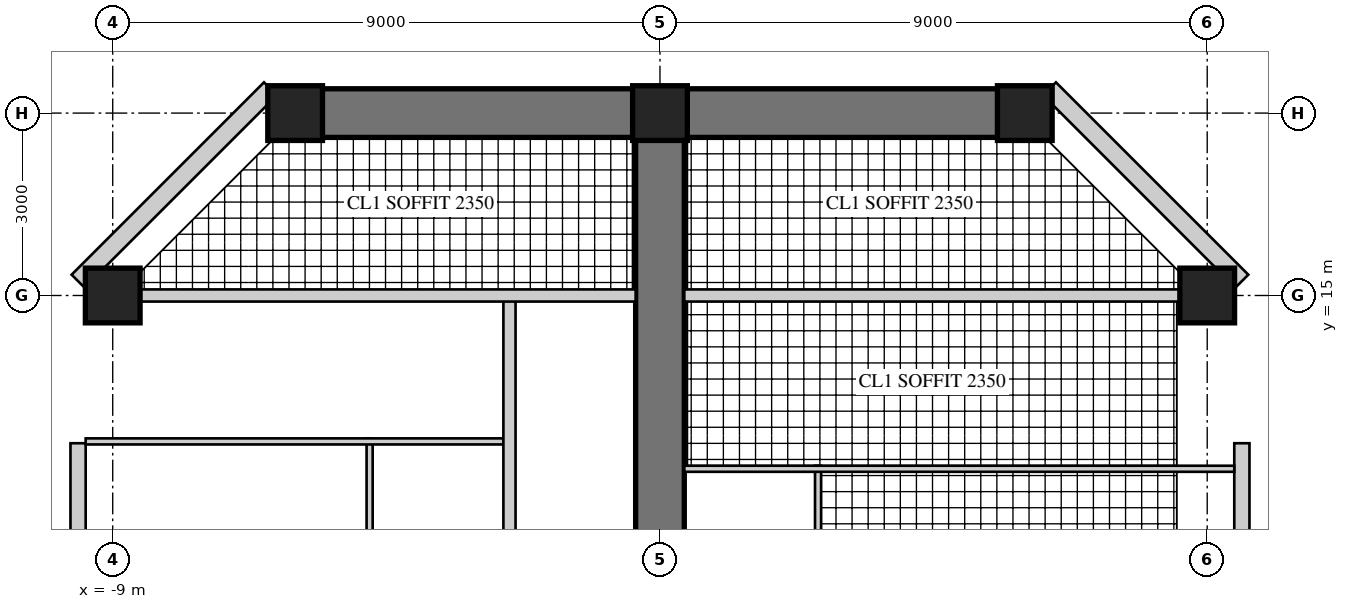
"""IFC4 building model, lengths in metres.
Left out: names, types, materials, properties, quantities, classifications, styles, units other than length and angle.
Written with IfcOpenShell. Run it as: python <this file> out.ifc"""

import sys

from ifc_helpers import new_model, si_unit, direction, frame, frame_2d, origin, origin_2d, place, context, subcontext, project, spatial, rectangle, hollow_rectangle, extrude, element, fill, save


model = new_model("IFC4")
c1 = context("Model", 3, precision=1e-05, world=origin(), true_north=direction((0.0, 1.0)))
c2 = subcontext(c1, "Body", "Model", "MODEL_VIEW")
j1 = project(units=[si_unit("LENGTHUNIT", "METRE"), si_unit("PLANEANGLEUNIT", "RADIAN")], contexts=[c1])
p1 = place(None, origin())
s1 = spatial("IfcSite", under=j1, at=p1, CompositionType="ELEMENT")
p2 = place(p1, origin())
s2 = spatial("IfcBuilding", under=s1, at=p2, CompositionType="ELEMENT")
p3 = place(p2, frame((0.0, 0.0, 179.7)))
s3 = spatial("IfcBuildingStorey", under=s2, at=p3, CompositionType="ELEMENT", Elevation=179.7)
p4 = place(p3, frame((0.0, 9.0, 0.0), z_axis=(0.0, 0.0, 1.0), x_axis=(0.0, 1.0, 0.0)))
e1 = element("IfcWall", 1, at=p4, inside=s3, PredefinedType="SHEAR", context=c2, shape_type="SweptSolid", body=[
    extrude(rectangle(XDim=9.0, YDim=0.8, at=frame_2d((4.5, 0.0))), origin(), (0.0, 0.0, 1.0), 3.4),
])
p5 = place(p4, frame((3.95, 0.0, 0.0)))
e2 = element("IfcOpeningElement", 2, at=p5, cuts=e1, PredefinedType="OPENING", context=c2, shape_type="SweptSolid", body=[
    extrude(rectangle(XDim=1.0, YDim=2.15, at=frame_2d((0.5, 1.075))), frame((0.0, 0.41, 0.0), z_axis=(0.0, -1.0, 0.0), x_axis=(1.0, 0.0, 0.0)), (0.0, 0.0, 1.0), 0.82),
])
p6 = place(p4, frame((7.0, 0.0, 0.0)))
e3 = element("IfcOpeningElement", 3, at=p6, cuts=e1, PredefinedType="OPENING", context=c2, shape_type="SweptSolid", body=[
    extrude(rectangle(XDim=1.0, YDim=2.2, at=frame_2d((0.5, 1.1))), frame((0.0, 0.41, 0.0), z_axis=(0.0, -1.0, 0.0), x_axis=(1.0, 0.0, 0.0)), (0.0, 0.0, 1.0), 0.82),
])
p7 = place(p3, frame((6.0, 18.0, 0.0), z_axis=(0.0, 0.0, 1.0), x_axis=(-1.0, 0.0, 0.0)))
e4 = element("IfcWall", 4, at=p7, inside=s3, PredefinedType="SHEAR", context=c2, shape_type="SweptSolid", body=[
    extrude(rectangle(XDim=12.0, YDim=0.8, at=frame_2d((6.0, 0.0))), origin(), (0.0, 0.0, 1.0), 3.4),
])
p8 = place(p7, frame((1.625, 0.0, 0.6)))
e5 = element("IfcOpeningElement", 5, at=p8, cuts=e4, PredefinedType="OPENING", context=c2, shape_type="SweptSolid", body=[
    extrude(rectangle(XDim=3.0, YDim=2.4, at=frame_2d((1.5, 1.2))), frame((0.0, 0.41, 0.0), z_axis=(0.0, -1.0, 0.0), x_axis=(1.0, 0.0, 0.0)), (0.0, 0.0, 1.0), 0.82),
])
p9 = place(p7, frame((7.375, 0.0, 0.6)))
e6 = element("IfcOpeningElement", 6, at=p9, cuts=e4, PredefinedType="OPENING", context=c2, shape_type="SweptSolid", body=[
    extrude(rectangle(XDim=3.0, YDim=2.4, at=frame_2d((1.5, 1.2))), frame((0.0, 0.41, 0.0), z_axis=(0.0, -1.0, 0.0), x_axis=(1.0, 0.0, 0.0)), (0.0, 0.0, 1.0), 0.82),
])
for number, where, z_axis, x_axis in (
    (7, (9.0, 15.0, 0.0), (0.0, 0.0, 1.0), (1.0, 0.0, 0.0)),
    (8, (-9.0, 15.0, 0.0), (0.0, 0.0, 1.0), (1.0, 0.0, 0.0)),
    (9, (6.0, 18.0, 0.0), (0.0, 0.0, 1.0), (1.0, 0.0, 0.0)),
    (10, (0.0, 18.0, 0.0), (0.0, 0.0, 1.0), (1.0, 0.0, 0.0)),
    (11, (-6.0, 18.0, 0.0), (0.0, 0.0, 1.0), (1.0, 0.0, 0.0)),
):
    element("IfcColumn", number, at=place(p3, frame(where, z_axis=z_axis, x_axis=x_axis)), inside=s3, PredefinedType="COLUMN", context=c2, shape_type="SweptSolid", body=[
        extrude(rectangle(XDim=0.9, YDim=0.9, at=origin_2d()), origin(), (0.0, 0.0, 1.0), 3.4),
    ])
p10 = place(p3, frame((9.57, 9.445, 0.0), z_axis=(0.0, 0.0, 1.0), x_axis=(0.0, 1.0, 0.0)))
e12 = element("IfcWall", 12, at=p10, inside=s3, PredefinedType="SOLIDWALL", context=c2, shape_type="SweptSolid", body=[
    extrude(rectangle(XDim=3.125, YDim=0.25, at=frame_2d((1.562, 0.0))), origin(), (0.0, 0.0, 1.0), 3.22),
])
p11 = place(p10, frame((0.6, 0.0, 0.0)))
e13 = element("IfcOpeningElement", 13, at=p11, cuts=e12, PredefinedType="OPENING", context=c2, shape_type="SweptSolid", body=[
    extrude(rectangle(XDim=1.0, YDim=2.2, at=frame_2d((0.5, 1.1))), frame((0.0, 0.135, 0.0), z_axis=(0.0, -1.0, 0.0), x_axis=(1.0, 0.0, 0.0)), (0.0, 0.0, 1.0), 0.27),
])
p12 = place(p3, frame((9.57, 15.236, 0.0), z_axis=(0.0, 0.0, 1.0), x_axis=(-0.707134062067, 0.707079499254, 0.0)))
e14 = element("IfcWall", 14, at=p12, inside=s3, PredefinedType="SOLIDWALL", context=c2, shape_type="SweptSolid", body=[
    extrude(rectangle(XDim=4.475, YDim=0.3, at=frame_2d((2.237, 0.0))), origin(), (0.0, 0.0, 1.0), 3.22),
])
p13 = place(p12, frame((1.787, 0.0, 0.3)))
e15 = element("IfcOpeningElement", 15, at=p13, cuts=e14, PredefinedType="OPENING", context=c2, shape_type="SweptSolid", body=[
    extrude(rectangle(XDim=0.9, YDim=2.4, at=frame_2d((0.45, 1.2))), frame((0.0, 0.16, 0.0), z_axis=(0.0, -1.0, 0.0), x_axis=(1.0, 0.0, 0.0)), (0.0, 0.0, 1.0), 0.32),
])
p14 = place(p3, frame((-6.406, 18.4, 0.0), z_axis=(0.0, 0.0, 1.0), x_axis=(-0.707134062067, -0.707079499254, 0.0)))
e16 = element("IfcWall", 16, at=p14, inside=s3, PredefinedType="SOLIDWALL", context=c2, shape_type="SweptSolid", body=[
    extrude(rectangle(XDim=4.475, YDim=0.3, at=frame_2d((2.237, 0.0))), origin(), (0.0, 0.0, 1.0), 3.22),
])
p15 = place(p14, frame((1.787, 0.0, 0.3)))
e17 = element("IfcOpeningElement", 17, at=p15, cuts=e16, PredefinedType="OPENING", context=c2, shape_type="SweptSolid", body=[
    extrude(rectangle(XDim=0.9, YDim=2.4, at=frame_2d((0.45, 1.2))), frame((0.0, 0.16, 0.0), z_axis=(0.0, -1.0, 0.0), x_axis=(1.0, 0.0, 0.0)), (0.0, 0.0, 1.0), 0.32),
])
p16 = place(p3, frame((-9.57, 12.57, 0.0), z_axis=(0.0, 0.0, 1.0), x_axis=(0.0, -1.0, 0.0)))
e18 = element("IfcWall", 18, at=p16, inside=s3, PredefinedType="SOLIDWALL", context=c2, shape_type="SweptSolid", body=[
    extrude(rectangle(XDim=2.875, YDim=0.25, at=frame_2d((1.438, 0.0))), origin(), (0.0, 0.0, 1.0), 3.22),
])
p17 = place(p16, frame((0.6, 0.0, 0.0)))
e19 = element("IfcOpeningElement", 19, at=p17, cuts=e18, PredefinedType="OPENING", context=c2, shape_type="SweptSolid", body=[
    extrude(rectangle(XDim=1.0, YDim=2.2, at=frame_2d((0.5, 1.1))), frame((0.0, 0.135, 0.0), z_axis=(0.0, -1.0, 0.0), x_axis=(1.0, 0.0, 0.0)), (0.0, 0.0, 1.0), 0.27),
])
p18 = place(p3, frame((-4.775, 9.55, 0.0), z_axis=(0.0, 0.0, 1.0), x_axis=(0.0, 1.0, 0.0)))
e20 = element("IfcWall", 20, at=p18, inside=s3, PredefinedType="PARTITIONING", context=c2, shape_type="SweptSolid", body=[
    extrude(rectangle(XDim=3.1, YDim=0.1, at=frame_2d((1.55, 0.0))), origin(), (0.0, 0.0, 1.0), 3.22),
])
p19 = place(p3, frame((-2.575, 12.6, 0.0), z_axis=(0.0, 0.0, 1.0), x_axis=(-1.0, 0.0, 0.0)))
e21 = element("IfcWall", 21, at=p19, inside=s3, PredefinedType="PARTITIONING", context=c2, shape_type="SweptSolid", body=[
    extrude(rectangle(XDim=6.87, YDim=0.1, at=frame_2d((3.435, 0.0))), origin(), (0.0, 0.0, 1.0), 3.22),
])
p20 = place(p19, frame((0.55, 0.0, 0.0)))
e22 = element("IfcOpeningElement", 22, at=p20, cuts=e21, PredefinedType="OPENING", context=c2, shape_type="SweptSolid", body=[
    extrude(rectangle(XDim=0.9, YDim=2.1, at=frame_2d((0.45, 1.05))), frame((0.0, 0.06, 0.0), z_axis=(0.0, -1.0, 0.0), x_axis=(1.0, 0.0, 0.0)), (0.0, 0.0, 1.0), 0.12),
])
p21 = place(p19, frame((2.65, 0.0, 0.0)))
e23 = element("IfcOpeningElement", 23, at=p21, cuts=e21, PredefinedType="OPENING", context=c2, shape_type="SweptSolid", body=[
    extrude(rectangle(XDim=0.9, YDim=2.1, at=frame_2d((0.45, 1.05))), frame((0.0, 0.06, 0.0), z_axis=(0.0, -1.0, 0.0), x_axis=(1.0, 0.0, 0.0)), (0.0, 0.0, 1.0), 0.12),
])
p22 = place(p3, frame((2.6, 9.55, 0.0), z_axis=(0.0, 0.0, 1.0), x_axis=(0.0, 1.0, 0.0)))
e24 = element("IfcWall", 24, at=p22, inside=s3, PredefinedType="PARTITIONING", context=c2, shape_type="SweptSolid", body=[
    extrude(rectangle(XDim=2.65, YDim=0.1, at=frame_2d((1.325, 0.0))), origin(), (0.0, 0.0, 1.0), 3.22),
])
p23 = place(p3, frame((9.445, 12.15, 0.0), z_axis=(0.0, 0.0, 1.0), x_axis=(-1.0, 0.0, 0.0)))
e25 = element("IfcWall", 25, at=p23, inside=s3, PredefinedType="PARTITIONING", context=c2, shape_type="SweptSolid", body=[
    extrude(rectangle(XDim=9.045, YDim=0.1, at=frame_2d((4.522, 0.0))), origin(), (0.0, 0.0, 1.0), 3.22),
])
p24 = place(p23, frame((5.495, 0.0, 0.0)))
e26 = element("IfcOpeningElement", 26, at=p24, cuts=e25, PredefinedType="OPENING", context=c2, shape_type="SweptSolid", body=[
    extrude(rectangle(XDim=0.9, YDim=2.1, at=frame_2d((0.45, 1.05))), frame((0.0, 0.06, 0.0), z_axis=(0.0, -1.0, 0.0), x_axis=(1.0, 0.0, 0.0)), (0.0, 0.0, 1.0), 0.12),
])
p25 = place(p23, frame((7.595, 0.0, 0.0)))
e27 = element("IfcOpeningElement", 27, at=p25, cuts=e25, PredefinedType="OPENING", context=c2, shape_type="SweptSolid", body=[
    extrude(rectangle(XDim=0.9, YDim=2.1, at=frame_2d((0.45, 1.05))), frame((0.0, 0.06, 0.0), z_axis=(0.0, -1.0, 0.0), x_axis=(1.0, 0.0, 0.0)), (0.0, 0.0, 1.0), 0.12),
])
p26 = place(p3, frame((-2.475, 9.55, 0.0), z_axis=(0.0, 0.0, 1.0), x_axis=(0.0, 1.0, 0.0)))
e28 = element("IfcWall", 28, at=p26, inside=s3, PredefinedType="SOLIDWALL", context=c2, shape_type="SweptSolid", body=[
    extrude(rectangle(XDim=5.45, YDim=0.2, at=frame_2d((2.725, 0.0))), origin(), (0.0, 0.0, 1.0), 3.22),
])
p27 = place(p26, frame((3.6, 0.0, 0.0)))
e29 = element("IfcOpeningElement", 29, at=p27, cuts=e28, PredefinedType="OPENING", context=c2, shape_type="SweptSolid", body=[
    extrude(rectangle(XDim=1.0, YDim=2.15, at=frame_2d((0.5, 1.075))), frame((0.0, 0.11, 0.0), z_axis=(0.0, -1.0, 0.0), x_axis=(1.0, 0.0, 0.0)), (0.0, 0.0, 1.0), 0.22),
])
p28 = place(p3, frame((8.55, 15.0, 0.0), z_axis=(0.0, 0.0, 1.0), x_axis=(-1.0, 0.0, 0.0)))
e30 = element("IfcWall", 30, at=p28, inside=s3, PredefinedType="SOLIDWALL", context=c2, shape_type="SweptSolid", body=[
    extrude(rectangle(XDim=8.15, YDim=0.2, at=frame_2d((4.075, 0.0))), origin(), (0.0, 0.0, 1.0), 2.47),
])
p29 = place(p3, frame((-0.4, 15.0, 0.0), z_axis=(0.0, 0.0, 1.0), x_axis=(-1.0, 0.0, 0.0)))
e31 = element("IfcWall", 31, at=p29, inside=s3, PredefinedType="SOLIDWALL", context=c2, shape_type="SweptSolid", body=[
    extrude(rectangle(XDim=8.15, YDim=0.2, at=frame_2d((4.075, 0.0))), origin(), (0.0, 0.0, 1.0), 2.47),
])
p30 = place(p29, frame((0.4, 0.0, 0.0)))
e32 = element("IfcOpeningElement", 32, at=p30, cuts=e31, PredefinedType="OPENING", context=c2, shape_type="SweptSolid", body=[
    extrude(rectangle(XDim=1.0, YDim=2.2, at=frame_2d((0.5, 1.1))), frame((0.0, 0.11, 0.0), z_axis=(0.0, -1.0, 0.0), x_axis=(1.0, 0.0, 0.0)), (0.0, 0.0, 1.0), 0.22),
])
p31 = place(p13, origin())
e33 = element("IfcWindow", 33, at=p31, inside=s3, PartitioningType="SINGLE_PANEL", PredefinedType="WINDOW", context=c2, shape_type="SweptSolid", body=[
    extrude(hollow_rectangle(XDim=0.9, YDim=2.4, WallThickness=0.06, at=frame_2d((0.45, 1.2))), frame((0.0, 0.03, 0.0), z_axis=(0.0, -1.0, 0.0), x_axis=(1.0, 0.0, 0.0)), (0.0, 0.0, 1.0), 0.06),
    extrude(rectangle(XDim=0.779, YDim=2.279, at=frame_2d((0.45, 1.2))), frame((0.0, 0.03, 0.0), z_axis=(0.0, -1.0, 0.0), x_axis=(1.0, 0.0, 0.0)), (0.0, 0.0, 1.0), 0.06),
])
fill(e15, e33)
p32 = place(p8, origin())
e34 = element("IfcWindow", 34, at=p32, inside=s3, PartitioningType="SINGLE_PANEL", PredefinedType="WINDOW", context=c2, shape_type="SweptSolid", body=[
    extrude(hollow_rectangle(XDim=3.0, YDim=2.4, WallThickness=0.06, at=frame_2d((1.5, 1.2))), frame((0.0, 0.03, 0.0), z_axis=(0.0, -1.0, 0.0), x_axis=(1.0, 0.0, 0.0)), (0.0, 0.0, 1.0), 0.06),
    extrude(rectangle(XDim=2.879, YDim=2.279, at=frame_2d((1.5, 1.2))), frame((0.0, 0.03, 0.0), z_axis=(0.0, -1.0, 0.0), x_axis=(1.0, 0.0, 0.0)), (0.0, 0.0, 1.0), 0.06),
])
fill(e5, e34)
p33 = place(p9, origin())
e35 = element("IfcWindow", 35, at=p33, inside=s3, PartitioningType="SINGLE_PANEL", PredefinedType="WINDOW", context=c2, shape_type="SweptSolid", body=[
    extrude(hollow_rectangle(XDim=3.0, YDim=2.4, WallThickness=0.06, at=frame_2d((1.5, 1.2))), frame((0.0, 0.03, 0.0), z_axis=(0.0, -1.0, 0.0), x_axis=(1.0, 0.0, 0.0)), (0.0, 0.0, 1.0), 0.06),
    extrude(rectangle(XDim=2.879, YDim=2.279, at=frame_2d((1.5, 1.2))), frame((0.0, 0.03, 0.0), z_axis=(0.0, -1.0, 0.0), x_axis=(1.0, 0.0, 0.0)), (0.0, 0.0, 1.0), 0.06),
])
fill(e6, e35)
p34 = place(p15, origin())
e36 = element("IfcWindow", 36, at=p34, inside=s3, PartitioningType="SINGLE_PANEL", PredefinedType="WINDOW", context=c2, shape_type="SweptSolid", body=[
    extrude(hollow_rectangle(XDim=0.9, YDim=2.4, WallThickness=0.06, at=frame_2d((0.45, 1.2))), frame((0.0, 0.03, 0.0), z_axis=(0.0, -1.0, 0.0), x_axis=(1.0, 0.0, 0.0)), (0.0, 0.0, 1.0), 0.06),
    extrude(rectangle(XDim=0.779, YDim=2.279, at=frame_2d((0.45, 1.2))), frame((0.0, 0.03, 0.0), z_axis=(0.0, -1.0, 0.0), x_axis=(1.0, 0.0, 0.0)), (0.0, 0.0, 1.0), 0.06),
])
fill(e17, e36)
p35 = place(p17, origin())
e37 = element("IfcDoor", 37, at=p35, inside=s3, OperationType="SINGLE_SWING_LEFT", PredefinedType="DOOR", context=c2, shape_type="SweptSolid", body=[
    extrude(hollow_rectangle(XDim=1.0, YDim=2.2, WallThickness=0.06, at=frame_2d((0.5, 1.1))), frame((0.0, 0.025, 0.0), z_axis=(0.0, -1.0, 0.0), x_axis=(1.0, 0.0, 0.0)), (0.0, 0.0, 1.0), 0.05),
    extrude(rectangle(XDim=0.879, YDim=2.079, at=frame_2d((0.5, 1.1))), frame((0.0, 0.025, 0.0), z_axis=(0.0, -1.0, 0.0), x_axis=(1.0, 0.0, 0.0)), (0.0, 0.0, 1.0), 0.05),
])
fill(e19, e37)
p36 = place(p20, origin())
e38 = element("IfcDoor", 38, at=p36, inside=s3, OperationType="SINGLE_SWING_LEFT", PredefinedType="DOOR", context=c2, shape_type="SweptSolid", body=[
    extrude(rectangle(XDim=0.9, YDim=2.1, at=frame_2d((0.45, 1.05))), frame((0.0, 0.025, 0.0), z_axis=(0.0, -1.0, 0.0), x_axis=(1.0, 0.0, 0.0)), (0.0, 0.0, 1.0), 0.05),
])
fill(e22, e38)
p37 = place(p21, origin())
e39 = element("IfcDoor", 39, at=p37, inside=s3, OperationType="SINGLE_SWING_LEFT", PredefinedType="DOOR", context=c2, shape_type="SweptSolid", body=[
    extrude(rectangle(XDim=0.9, YDim=2.1, at=frame_2d((0.45, 1.05))), frame((0.0, 0.025, 0.0), z_axis=(0.0, -1.0, 0.0), x_axis=(1.0, 0.0, 0.0)), (0.0, 0.0, 1.0), 0.05),
])
fill(e23, e39)
p38 = place(p24, origin())
e40 = element("IfcDoor", 40, at=p38, inside=s3, OperationType="SINGLE_SWING_RIGHT", PredefinedType="DOOR", context=c2, shape_type="SweptSolid", body=[
    extrude(rectangle(XDim=0.9, YDim=2.1, at=frame_2d((0.45, 1.05))), frame((0.0, 0.025, 0.0), z_axis=(0.0, -1.0, 0.0), x_axis=(1.0, 0.0, 0.0)), (0.0, 0.0, 1.0), 0.05),
])
fill(e26, e40)
p39 = place(p25, origin())
e41 = element("IfcDoor", 41, at=p39, inside=s3, OperationType="SINGLE_SWING_RIGHT", PredefinedType="DOOR", context=c2, shape_type="SweptSolid", body=[
    extrude(rectangle(XDim=0.9, YDim=2.1, at=frame_2d((0.45, 1.05))), frame((0.0, 0.025, 0.0), z_axis=(0.0, -1.0, 0.0), x_axis=(1.0, 0.0, 0.0)), (0.0, 0.0, 1.0), 0.05),
])
fill(e27, e41)
p40 = place(p27, origin())
e42 = element("IfcDoor", 42, at=p40, inside=s3, OperationType="SINGLE_SWING_LEFT", PredefinedType="DOOR", context=c2, shape_type="SweptSolid", body=[
    extrude(rectangle(XDim=1.0, YDim=2.15, at=frame_2d((0.5, 1.075))), frame((0.0, 0.025, 0.0), z_axis=(0.0, -1.0, 0.0), x_axis=(1.0, 0.0, 0.0)), (0.0, 0.0, 1.0), 0.05),
])
fill(e29, e42)
p41 = place(p30, frame((1.0, 0.0, 0.0), z_axis=(0.0, 0.0, 1.0), x_axis=(-1.0, 0.0, 0.0)))
e43 = element("IfcDoor", 43, at=p41, inside=s3, OperationType="SINGLE_SWING_RIGHT", PredefinedType="DOOR", context=c2, shape_type="SweptSolid", body=[
    extrude(rectangle(XDim=1.0, YDim=2.2, at=frame_2d((0.5, 1.1))), frame((0.0, 0.025, 0.0), z_axis=(0.0, -1.0, 0.0), x_axis=(1.0, 0.0, 0.0)), (0.0, 0.0, 1.0), 0.05),
])
fill(e32, e43)
p42 = place(p5, frame((1.0, 0.0, 0.0), z_axis=(0.0, 0.0, 1.0), x_axis=(-1.0, 0.0, 0.0)))
e44 = element("IfcDoor", 44, at=p42, inside=s3, OperationType="SINGLE_SWING_RIGHT", PredefinedType="DOOR", context=c2, shape_type="SweptSolid", body=[
    extrude(rectangle(XDim=1.0, YDim=2.15, at=frame_2d((0.5, 1.075))), frame((0.0, 0.025, 0.0), z_axis=(0.0, -1.0, 0.0), x_axis=(1.0, 0.0, 0.0)), (0.0, 0.0, 1.0), 0.05),
])
fill(e2, e44)
p43 = place(p6, origin())
e45 = element("IfcDoor", 45, at=p43, inside=s3, OperationType="SINGLE_SWING_RIGHT", PredefinedType="DOOR", context=c2, shape_type="SweptSolid", body=[
    extrude(rectangle(XDim=1.0, YDim=2.2, at=frame_2d((0.5, 1.1))), frame((0.0, 0.025, 0.0), z_axis=(0.0, -1.0, 0.0), x_axis=(1.0, 0.0, 0.0)), (0.0, 0.0, 1.0), 0.05),
])
fill(e3, e45)
save(model, sys.argv[1])
